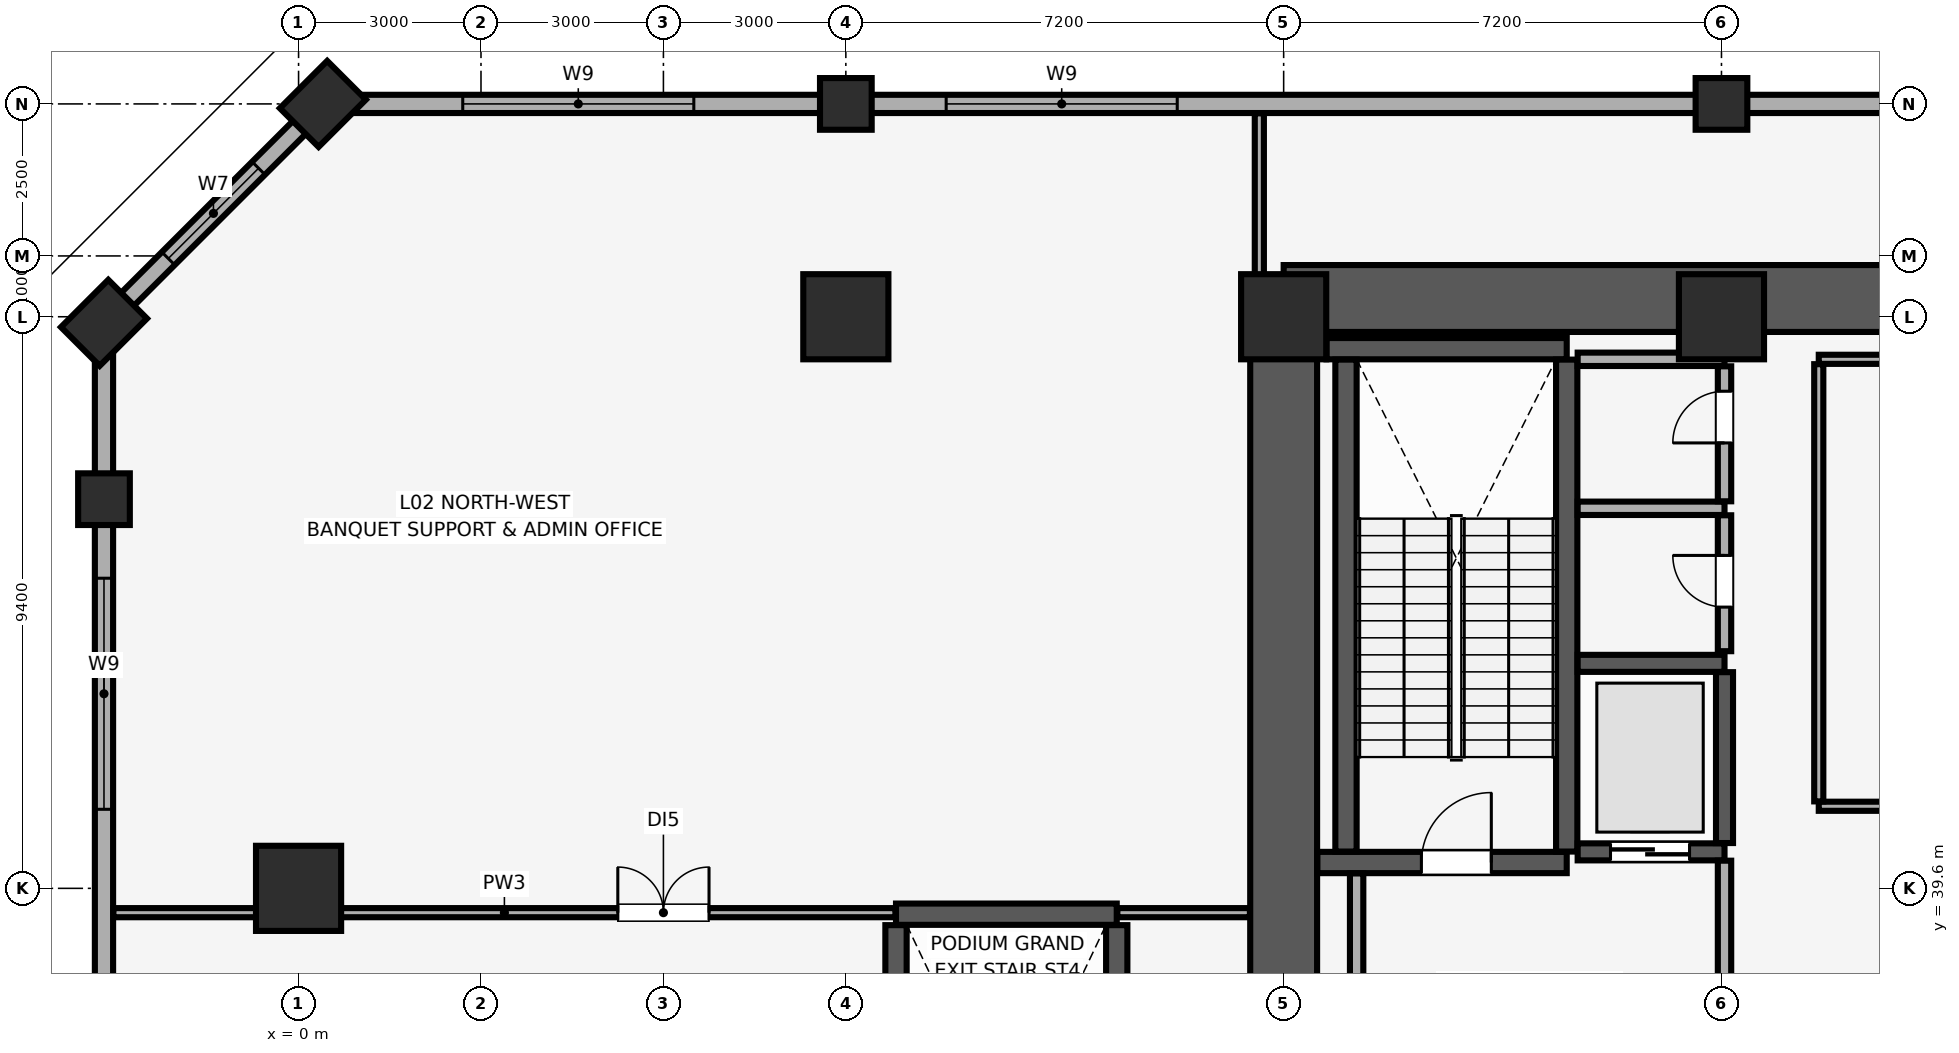
"""IFC4 building model, lengths in metres.
Left out: names, types, materials, properties, quantities, classifications, styles, units other than length and angle.
Written with IfcOpenShell. Run it as: python <this file> out.ifc"""

import sys

from ifc_helpers import new_model, si_unit, direction, frame, frame_2d, origin, origin_2d, place, context, subcontext, project, spatial, rectangle, extrude, element, fill, save


model = new_model("IFC4")
c1 = context("Model", 3, precision=1e-05, world=origin(), true_north=direction((0.0, 1.0)))
c2 = subcontext(c1, "Body", "Model", "MODEL_VIEW")
j1 = project(units=[si_unit("LENGTHUNIT", "METRE"), si_unit("PLANEANGLEUNIT", "RADIAN")], contexts=[c1])
p1 = place(None, origin())
s1 = spatial("IfcSite", under=j1, at=p1, CompositionType="ELEMENT")
p2 = place(p1, origin())
s2 = spatial("IfcBuilding", under=s1, at=p2, CompositionType="ELEMENT")
p3 = place(p2, frame((0.0, 0.0, 14.0)))
s3 = spatial("IfcBuildingStorey", under=s2, at=p3, CompositionType="ELEMENT", Elevation=14.0)
for number, where, z_axis, x_axis in (
    (1, (9.0, 52.5, 0.0), (0.0, 0.0, 1.0), (1.0, 0.0, 0.0)),
    (2, (23.4, 52.5, 0.0), (0.0, 0.0, 1.0), (1.0, 0.0, 0.0)),
    (3, (-3.2, 46.0, 0.0), (0.0, 0.0, 1.0), (1.0, 0.0, 0.0)),
):
    element("IfcColumn", number, at=place(p3, frame(where, z_axis=z_axis, x_axis=x_axis)), inside=s3, PredefinedType="COLUMN", context=c2, shape_type="SweptSolid", body=[
        extrude(rectangle(XDim=0.85, YDim=0.85, at=origin_2d()), origin(), (0.0, 0.0, 1.0), 5.08),
    ])
for number, where, z_axis, x_axis in (
    (4, (0.4, 52.5, 0.0), (0.0, 0.0, 1.0), (0.707, 0.707, 0.0)),
    (5, (-3.2, 48.9, 0.0), (0.0, 0.0, 1.0), (0.707, 0.707, 0.0)),
):
    element("IfcColumn", number, at=place(p3, frame(where, z_axis=z_axis, x_axis=x_axis)), inside=s3, PredefinedType="PILASTER", context=c2, shape_type="SweptSolid", body=[
        extrude(rectangle(XDim=1.1, YDim=0.9, at=origin_2d()), origin(), (0.0, 0.0, 1.0), 5.08),
    ])
for number, where, z_axis, x_axis in (
    (6, (9.0, 49.0, 0.0), (0.0, 0.0, 1.0), (1.0, 0.0, 0.0)),
    (7, (16.2, 49.0, 0.0), (0.0, 0.0, 1.0), (1.0, 0.0, 0.0)),
    (8, (23.4, 49.0, 0.0), (0.0, 0.0, 1.0), (1.0, 0.0, 0.0)),
    (9, (0.0, 39.6, 0.0), (0.0, 0.0, 1.0), (1.0, 0.0, 0.0)),
):
    element("IfcColumn", number, at=place(p3, frame(where, z_axis=z_axis, x_axis=x_axis)), inside=s3, PredefinedType="COLUMN", context=c2, shape_type="SweptSolid", body=[
        extrude(rectangle(XDim=1.4, YDim=1.4, at=origin_2d()), origin(), (0.0, 0.0, 1.0), 5.08),
    ])
p4 = place(p3, frame((83.6, 52.5, 0.0), z_axis=(0.0, 0.0, 1.0), x_axis=(-1.0, 0.0, 0.0)))
e10 = element("IfcWall", 10, at=p4, inside=s3, PredefinedType="SOLIDWALL", context=c2, shape_type="SweptSolid", body=[
    extrude(rectangle(XDim=83.2, YDim=0.3, at=frame_2d((41.6, 0.0))), origin(), (0.0, 0.0, 1.0), 4.13),
])
p5 = place(p4, frame((77.1, 0.0, 0.85)))
e11 = element("IfcOpeningElement", 11, at=p5, cuts=e10, PredefinedType="OPENING", context=c2, shape_type="SweptSolid", body=[
    extrude(rectangle(XDim=3.8, YDim=2.2, at=frame_2d((1.9, 1.1))), frame((0.0, 0.16, 0.0), z_axis=(0.0, -1.0, 0.0), x_axis=(1.0, 0.0, 0.0)), (0.0, 0.0, 1.0), 0.32),
])
p6 = place(p4, frame((69.15, 0.0, 0.85)))
e12 = element("IfcOpeningElement", 12, at=p6, cuts=e10, PredefinedType="OPENING", context=c2, shape_type="SweptSolid", body=[
    extrude(rectangle(XDim=3.8, YDim=2.2, at=frame_2d((1.9, 1.1))), frame((0.0, 0.16, 0.0), z_axis=(0.0, -1.0, 0.0), x_axis=(1.0, 0.0, 0.0)), (0.0, 0.0, 1.0), 0.32),
])
p7 = place(p4, frame((10.1, 0.0, 0.85)))
e13 = element("IfcOpeningElement", 13, at=p7, cuts=e10, PredefinedType="OPENING", context=c2, shape_type="SweptSolid", body=[
    extrude(rectangle(XDim=3.8, YDim=2.2, at=frame_2d((1.9, 1.1))), frame((0.0, 0.16, 0.0), z_axis=(0.0, -1.0, 0.0), x_axis=(1.0, 0.0, 0.0)), (0.0, 0.0, 1.0), 0.32),
])
p8 = place(p4, frame((2.3, 0.0, 0.85)))
e14 = element("IfcOpeningElement", 14, at=p8, cuts=e10, PredefinedType="OPENING", context=c2, shape_type="SweptSolid", body=[
    extrude(rectangle(XDim=3.8, YDim=2.2, at=frame_2d((1.9, 1.1))), frame((0.0, 0.16, 0.0), z_axis=(0.0, -1.0, 0.0), x_axis=(1.0, 0.0, 0.0)), (0.0, 0.0, 1.0), 0.32),
])
p9 = place(p3, frame((0.4, 52.5, 0.0), z_axis=(0.0, 0.0, 1.0), x_axis=(-0.707082803744, -0.707130757816, 0.0)))
e15 = element("IfcWall", 15, at=p9, inside=s3, PredefinedType="SOLIDWALL", context=c2, shape_type="SweptSolid", body=[
    extrude(rectangle(XDim=5.091, YDim=0.3, at=frame_2d((2.545, 0.0))), origin(), (0.0, 0.0, 1.0), 4.13),
])
p10 = place(p9, frame((1.496, 0.0, 0.85)))
e16 = element("IfcOpeningElement", 16, at=p10, cuts=e15, PredefinedType="OPENING", context=c2, shape_type="SweptSolid", body=[
    extrude(rectangle(XDim=2.1, YDim=1.6, at=frame_2d((1.05, 0.8))), frame((0.0, 0.16, 0.0), z_axis=(0.0, -1.0, 0.0), x_axis=(1.0, 0.0, 0.0)), (0.0, 0.0, 1.0), 0.32),
])
p11 = place(p3, frame((-3.2, 48.9, 0.0), z_axis=(0.0, 0.0, 1.0), x_axis=(0.0, -1.0, 0.0)))
e17 = element("IfcWall", 17, at=p11, inside=s3, PredefinedType="SOLIDWALL", context=c2, shape_type="SweptSolid", body=[
    extrude(rectangle(XDim=20.425, YDim=0.3, at=frame_2d((10.212, 0.0))), origin(), (0.0, 0.0, 1.0), 4.13),
])
p12 = place(p11, frame((12.5, 0.0, 0.85)))
e18 = element("IfcOpeningElement", 18, at=p12, cuts=e17, PredefinedType="OPENING", context=c2, shape_type="SweptSolid", body=[
    extrude(rectangle(XDim=3.8, YDim=2.2, at=frame_2d((1.9, 1.1))), frame((0.0, 0.16, 0.0), z_axis=(0.0, -1.0, 0.0), x_axis=(1.0, 0.0, 0.0)), (0.0, 0.0, 1.0), 0.32),
])
p13 = place(p11, frame((4.2, 0.0, 0.85)))
e19 = element("IfcOpeningElement", 19, at=p13, cuts=e17, PredefinedType="OPENING", context=c2, shape_type="SweptSolid", body=[
    extrude(rectangle(XDim=3.8, YDim=2.2, at=frame_2d((1.9, 1.1))), frame((0.0, 0.16, 0.0), z_axis=(0.0, -1.0, 0.0), x_axis=(1.0, 0.0, 0.0)), (0.0, 0.0, 1.0), 0.32),
])
p14 = place(p3, frame((16.2, 49.3, 0.0), z_axis=(0.0, 0.0, 1.0), x_axis=(1.0, 0.0, 0.0)))
e20 = element("IfcWall", 20, at=p14, inside=s3, PredefinedType="SHEAR", context=c2, shape_type="SweptSolid", body=[
    extrude(rectangle(XDim=51.6, YDim=1.1, at=frame_2d((25.8, 0.0))), origin(), (0.0, 0.0, 1.0), 5.08),
])
p15 = place(p3, frame((16.2, 29.4, 0.0), z_axis=(0.0, 0.0, 1.0), x_axis=(0.0, 1.0, 0.0)))
e21 = element("IfcWall", 21, at=p15, inside=s3, PredefinedType="SHEAR", context=c2, shape_type="SweptSolid", body=[
    extrude(rectangle(XDim=19.2, YDim=1.1, at=frame_2d((9.6, 0.0))), origin(), (0.0, 0.0, 1.0), 5.08),
])
p16 = place(p3, frame((16.755, 40.025, 0.0), z_axis=(0.0, 0.0, 1.0), x_axis=(1.0, 0.0, 0.0)))
e22 = element("IfcWall", 22, at=p16, inside=s3, PredefinedType="SHEAR", context=c2, shape_type="SweptSolid", body=[
    extrude(rectangle(XDim=4.1, YDim=0.35, at=frame_2d((2.05, 0.0))), origin(), (0.0, 0.0, 1.0), 5.08),
])
p17 = place(p16, frame((1.71, 0.0, 0.0)))
e23 = element("IfcOpeningElement", 23, at=p17, cuts=e22, PredefinedType="OPENING", context=c2, shape_type="SweptSolid", body=[
    extrude(rectangle(XDim=1.15, YDim=2.15, at=frame_2d((0.575, 1.075))), frame((0.0, 0.185, 0.0), z_axis=(0.0, -1.0, 0.0), x_axis=(1.0, 0.0, 0.0)), (0.0, 0.0, 1.0), 0.37),
])
p18 = place(p3, frame((16.905, 48.475, 0.0), z_axis=(0.0, 0.0, 1.0), x_axis=(1.0, 0.0, 0.0)))
e24 = element("IfcWall", 24, at=p18, inside=s3, PredefinedType="SHEAR", context=c2, shape_type="SweptSolid", body=[
    extrude(rectangle(XDim=3.95, YDim=0.35, at=frame_2d((1.975, 0.0))), origin(), (0.0, 0.0, 1.0), 5.08),
])
for number, where, z_axis, x_axis in (
    (25, (17.225, 40.205, 0.0), (0.0, 0.0, 1.0), (0.0, 1.0, 0.0)),
    (26, (20.855, 40.205, 0.0), (0.0, 0.0, 1.0), (0.0, 1.0, 0.0)),
):
    element("IfcWall", number, at=place(p3, frame(where, z_axis=z_axis, x_axis=x_axis)), inside=s3, PredefinedType="SHEAR", context=c2, shape_type="SweptSolid", body=[
        extrude(rectangle(XDim=8.09, YDim=0.35, at=frame_2d((4.045, 0.0))), origin(), (0.0, 0.0, 1.0), 5.08),
    ])
p19 = place(p3, frame((9.825, 39.175, 0.0), z_axis=(0.0, 0.0, 1.0), x_axis=(1.0, 0.0, 0.0)))
e27 = element("IfcWall", 27, at=p19, inside=s3, PredefinedType="SHEAR", context=c2, shape_type="SweptSolid", body=[
    extrude(rectangle(XDim=3.63, YDim=0.35, at=frame_2d((1.815, 0.0))), origin(), (0.0, 0.0, 1.0), 5.08),
])
for number, where, z_axis, x_axis in (
    (28, (9.825, 30.555, 0.0), (0.0, 0.0, 1.0), (0.0, 1.0, 0.0)),
    (29, (13.455, 30.555, 0.0), (0.0, 0.0, 1.0), (0.0, 1.0, 0.0)),
):
    element("IfcWall", number, at=place(p3, frame(where, z_axis=z_axis, x_axis=x_axis)), inside=s3, PredefinedType="SHEAR", context=c2, shape_type="SweptSolid", body=[
        extrude(rectangle(XDim=8.44, YDim=0.35, at=frame_2d((4.22, 0.0))), origin(), (0.0, 0.0, 1.0), 5.08),
    ])
p20 = place(p3, frame((21.035, 40.2, 0.0), z_axis=(0.0, 0.0, 1.0), x_axis=(1.0, 0.0, 0.0)))
e30 = element("IfcWall", 30, at=p20, inside=s3, PredefinedType="SHEAR", context=c2, shape_type="SweptSolid", body=[
    extrude(rectangle(XDim=2.415, YDim=0.28, at=frame_2d((1.208, 0.0))), origin(), (0.0, 0.0, 1.0), 5.08),
])
p21 = place(p20, frame((0.54, 0.0, 0.0)))
e31 = element("IfcOpeningElement", 31, at=p21, cuts=e30, PredefinedType="OPENING", context=c2, shape_type="SweptSolid", body=[
    extrude(rectangle(XDim=1.3, YDim=2.3, at=frame_2d((0.65, 1.15))), frame((0.0, 0.15, 0.0), z_axis=(0.0, -1.0, 0.0), x_axis=(1.0, 0.0, 0.0)), (0.0, 0.0, 1.0), 0.3),
])
p22 = place(p3, frame((21.035, 43.3, 0.0), z_axis=(0.0, 0.0, 1.0), x_axis=(1.0, 0.0, 0.0)))
e32 = element("IfcWall", 32, at=p22, inside=s3, PredefinedType="SHEAR", context=c2, shape_type="SweptSolid", body=[
    extrude(rectangle(XDim=2.415, YDim=0.28, at=frame_2d((1.208, 0.0))), origin(), (0.0, 0.0, 1.0), 5.08),
])
p23 = place(p3, frame((23.45, 40.345, 0.0), z_axis=(0.0, 0.0, 1.0), x_axis=(0.0, 1.0, 0.0)))
e33 = element("IfcWall", 33, at=p23, inside=s3, PredefinedType="SHEAR", context=c2, shape_type="SweptSolid", body=[
    extrude(rectangle(XDim=2.81, YDim=0.28, at=frame_2d((1.405, 0.0))), origin(), (0.0, 0.0, 1.0), 5.08),
])
p24 = place(p3, frame((17.4, 34.415, 0.0), z_axis=(0.0, 0.0, 1.0), x_axis=(0.0, 1.0, 0.0)))
e34 = element("IfcWall", 34, at=p24, inside=s3, PredefinedType="PARTITIONING", context=c2, shape_type="SweptSolid", body=[
    extrude(rectangle(XDim=5.43, YDim=0.22, at=frame_2d((2.715, 0.0))), origin(), (0.0, 0.0, 1.0), 5.08),
])
p25 = place(p3, frame((23.45, 34.415, 0.0), z_axis=(0.0, 0.0, 1.0), x_axis=(0.0, 1.0, 0.0)))
e35 = element("IfcWall", 35, at=p25, inside=s3, PredefinedType="PARTITIONING", context=c2, shape_type="SweptSolid", body=[
    extrude(rectangle(XDim=5.64, YDim=0.22, at=frame_2d((2.82, 0.0))), origin(), (0.0, 0.0, 1.0), 5.08),
])
p26 = place(p3, frame((21.035, 45.85, 0.0), z_axis=(0.0, 0.0, 1.0), x_axis=(1.0, 0.0, 0.0)))
e36 = element("IfcWall", 36, at=p26, inside=s3, PredefinedType="PARTITIONING", context=c2, shape_type="SweptSolid", body=[
    extrude(rectangle(XDim=2.415, YDim=0.22, at=frame_2d((1.208, 0.0))), origin(), (0.0, 0.0, 1.0), 5.08),
])
p27 = place(p3, frame((23.45, 43.5, 0.0), z_axis=(0.0, 0.0, 1.0), x_axis=(0.0, 1.0, 0.0)))
e37 = element("IfcWall", 37, at=p27, inside=s3, PredefinedType="PARTITIONING", context=c2, shape_type="SweptSolid", body=[
    extrude(rectangle(XDim=2.235, YDim=0.22, at=frame_2d((1.118, 0.0))), origin(), (0.0, 0.0, 1.0), 5.08),
])
p28 = place(p27, frame((0.725, 0.0, 0.0)))
e38 = element("IfcOpeningElement", 38, at=p28, cuts=e37, PredefinedType="OPENING", context=c2, shape_type="SweptSolid", body=[
    extrude(rectangle(XDim=0.85, YDim=2.1, at=frame_2d((0.425, 1.05))), frame((0.0, 0.12, 0.0), z_axis=(0.0, -1.0, 0.0), x_axis=(1.0, 0.0, 0.0)), (0.0, 0.0, 1.0), 0.24),
])
p29 = place(p3, frame((21.035, 48.3, 0.0), z_axis=(0.0, 0.0, 1.0), x_axis=(1.0, 0.0, 0.0)))
e39 = element("IfcWall", 39, at=p29, inside=s3, PredefinedType="PARTITIONING", context=c2, shape_type="SweptSolid", body=[
    extrude(rectangle(XDim=2.415, YDim=0.22, at=frame_2d((1.208, 0.0))), origin(), (0.0, 0.0, 1.0), 5.08),
])
p30 = place(p3, frame((23.45, 45.965, 0.0), z_axis=(0.0, 0.0, 1.0), x_axis=(0.0, 1.0, 0.0)))
e40 = element("IfcWall", 40, at=p30, inside=s3, PredefinedType="PARTITIONING", context=c2, shape_type="SweptSolid", body=[
    extrude(rectangle(XDim=2.22, YDim=0.22, at=frame_2d((1.11, 0.0))), origin(), (0.0, 0.0, 1.0), 5.08),
])
p31 = place(p30, frame((0.96, 0.0, 0.0)))
e41 = element("IfcOpeningElement", 41, at=p31, cuts=e40, PredefinedType="OPENING", context=c2, shape_type="SweptSolid", body=[
    extrude(rectangle(XDim=0.85, YDim=2.1, at=frame_2d((0.425, 1.05))), frame((0.0, 0.12, 0.0), z_axis=(0.0, -1.0, 0.0), x_axis=(1.0, 0.0, 0.0)), (0.0, 0.0, 1.0), 0.24),
])
p32 = place(p3, frame((25.0, 40.95, 0.0), z_axis=(0.0, 0.0, 1.0), x_axis=(1.0, 0.0, 0.0)))
e42 = element("IfcWall", 42, at=p32, inside=s3, PredefinedType="PARTITIONING", context=c2, shape_type="SweptSolid", body=[
    extrude(rectangle(XDim=7.8, YDim=0.15, at=frame_2d((3.9, 0.0))), origin(), (0.0, 0.0, 1.0), 5.08),
])
p33 = place(p32, frame((3.475, 0.0, 0.0)))
e43 = element("IfcOpeningElement", 43, at=p33, cuts=e42, PredefinedType="OPENING", context=c2, shape_type="SweptSolid", body=[
    extrude(rectangle(XDim=0.85, YDim=2.1, at=frame_2d((0.425, 1.05))), frame((0.0, 0.085, 0.0), z_axis=(0.0, -1.0, 0.0), x_axis=(1.0, 0.0, 0.0)), (0.0, 0.0, 1.0), 0.17),
])
p34 = place(p3, frame((25.0, 48.3, 0.0), z_axis=(0.0, 0.0, 1.0), x_axis=(1.0, 0.0, 0.0)))
e44 = element("IfcWall", 44, at=p34, inside=s3, PredefinedType="PARTITIONING", context=c2, shape_type="SweptSolid", body=[
    extrude(rectangle(XDim=7.8, YDim=0.15, at=frame_2d((3.9, 0.0))), origin(), (0.0, 0.0, 1.0), 5.08),
])
p35 = place(p3, frame((25.0, 41.03, 0.0), z_axis=(0.0, 0.0, 1.0), x_axis=(0.0, 1.0, 0.0)))
e45 = element("IfcWall", 45, at=p35, inside=s3, PredefinedType="PARTITIONING", context=c2, shape_type="SweptSolid", body=[
    extrude(rectangle(XDim=7.19, YDim=0.15, at=frame_2d((3.595, 0.0))), origin(), (0.0, 0.0, 1.0), 5.08),
])
p36 = place(p3, frame((-3.045, 39.2, 0.0), z_axis=(0.0, 0.0, 1.0), x_axis=(1.0, 0.0, 0.0)))
e46 = element("IfcWall", 46, at=p36, inside=s3, PredefinedType="PARTITIONING", context=c2, shape_type="SweptSolid", body=[
    extrude(rectangle(XDim=12.86, YDim=0.15, at=frame_2d((6.43, 0.0))), origin(), (0.0, 0.0, 1.0), 5.08),
])
p37 = place(p36, frame((8.295, 0.0, 0.0)))
e47 = element("IfcOpeningElement", 47, at=p37, cuts=e46, PredefinedType="OPENING", context=c2, shape_type="SweptSolid", body=[
    extrude(rectangle(XDim=1.5, YDim=2.25, at=frame_2d((0.75, 1.125))), frame((0.0, 0.085, 0.0), z_axis=(0.0, -1.0, 0.0), x_axis=(1.0, 0.0, 0.0)), (0.0, 0.0, 1.0), 0.17),
])
p38 = place(p3, frame((13.465, 39.2, 0.0), z_axis=(0.0, 0.0, 1.0), x_axis=(1.0, 0.0, 0.0)))
e48 = element("IfcWall", 48, at=p38, inside=s3, PredefinedType="PARTITIONING", context=c2, shape_type="SweptSolid", body=[
    extrude(rectangle(XDim=2.18, YDim=0.15, at=frame_2d((1.09, 0.0))), origin(), (0.0, 0.0, 1.0), 5.08),
])
p39 = place(p3, frame((15.8, 48.61, 0.0), z_axis=(0.0, 0.0, 1.0), x_axis=(0.0, 1.0, 0.0)))
e49 = element("IfcWall", 49, at=p39, inside=s3, PredefinedType="PARTITIONING", context=c2, shape_type="SweptSolid", body=[
    extrude(rectangle(XDim=3.735, YDim=0.15, at=frame_2d((1.867, 0.0))), origin(), (0.0, 0.0, 1.0), 5.08),
])
p40 = place(p10, origin())
e50 = element("IfcWindow", 50, at=p40, inside=s3, PartitioningType="SINGLE_PANEL", PredefinedType="WINDOW", context=c2, shape_type="SweptSolid", body=[
    extrude(rectangle(XDim=2.1, YDim=1.6, at=frame_2d((1.05, 0.8))), frame((0.0, 0.03, 0.0), z_axis=(0.0, -1.0, 0.0), x_axis=(1.0, 0.0, 0.0)), (0.0, 0.0, 1.0), 0.06),
])
fill(e16, e50)
p41 = place(p13, origin())
e51 = element("IfcWindow", 51, at=p41, inside=s3, PartitioningType="SINGLE_PANEL", PredefinedType="WINDOW", context=c2, shape_type="SweptSolid", body=[
    extrude(rectangle(XDim=3.8, YDim=2.2, at=frame_2d((1.9, 1.1))), frame((0.0, 0.03, 0.0), z_axis=(0.0, -1.0, 0.0), x_axis=(1.0, 0.0, 0.0)), (0.0, 0.0, 1.0), 0.06),
])
fill(e19, e51)
p42 = place(p5, origin())
e52 = element("IfcWindow", 52, at=p42, inside=s3, PartitioningType="SINGLE_PANEL", PredefinedType="WINDOW", context=c2, shape_type="SweptSolid", body=[
    extrude(rectangle(XDim=3.8, YDim=2.2, at=frame_2d((1.9, 1.1))), frame((0.0, 0.03, 0.0), z_axis=(0.0, -1.0, 0.0), x_axis=(1.0, 0.0, 0.0)), (0.0, 0.0, 1.0), 0.06),
])
fill(e11, e52)
p43 = place(p6, origin())
e53 = element("IfcWindow", 53, at=p43, inside=s3, PartitioningType="SINGLE_PANEL", PredefinedType="WINDOW", context=c2, shape_type="SweptSolid", body=[
    extrude(rectangle(XDim=3.8, YDim=2.2, at=frame_2d((1.9, 1.1))), frame((0.0, 0.03, 0.0), z_axis=(0.0, -1.0, 0.0), x_axis=(1.0, 0.0, 0.0)), (0.0, 0.0, 1.0), 0.06),
])
fill(e12, e53)
p44 = place(p17, origin())
e54 = element("IfcDoor", 54, at=p44, inside=s3, OperationType="SINGLE_SWING_RIGHT", PredefinedType="DOOR", context=c2, shape_type="SweptSolid", body=[
    extrude(rectangle(XDim=1.15, YDim=2.15, at=frame_2d((0.575, 1.075))), frame((0.0, 0.025, 0.0), z_axis=(0.0, -1.0, 0.0), x_axis=(1.0, 0.0, 0.0)), (0.0, 0.0, 1.0), 0.05),
])
fill(e23, e54)
p45 = place(p21, origin())
e55 = element("IfcDoor", 55, at=p45, inside=s3, OperationType="DOUBLE_DOOR_SLIDING", PredefinedType="DOOR", context=c2, shape_type="SweptSolid", body=[
    extrude(rectangle(XDim=1.3, YDim=2.3, at=frame_2d((0.65, 1.15))), frame((0.0, 0.025, 0.0), z_axis=(0.0, -1.0, 0.0), x_axis=(1.0, 0.0, 0.0)), (0.0, 0.0, 1.0), 0.05),
])
fill(e31, e55)
p46 = place(p28, origin())
e56 = element("IfcDoor", 56, at=p46, inside=s3, OperationType="SINGLE_SWING_RIGHT", PredefinedType="DOOR", context=c2, shape_type="SweptSolid", body=[
    extrude(rectangle(XDim=0.85, YDim=2.1, at=frame_2d((0.425, 1.05))), frame((0.0, 0.025, 0.0), z_axis=(0.0, -1.0, 0.0), x_axis=(1.0, 0.0, 0.0)), (0.0, 0.0, 1.0), 0.05),
])
fill(e38, e56)
p47 = place(p31, origin())
e57 = element("IfcDoor", 57, at=p47, inside=s3, OperationType="SINGLE_SWING_LEFT", PredefinedType="DOOR", context=c2, shape_type="SweptSolid", body=[
    extrude(rectangle(XDim=0.85, YDim=2.1, at=frame_2d((0.425, 1.05))), frame((0.0, 0.025, 0.0), z_axis=(0.0, -1.0, 0.0), x_axis=(1.0, 0.0, 0.0)), (0.0, 0.0, 1.0), 0.05),
])
fill(e41, e57)
p48 = place(p37, origin())
e58 = element("IfcDoor", 58, at=p48, inside=s3, OperationType="DOUBLE_DOOR_SINGLE_SWING", PredefinedType="DOOR", context=c2, shape_type="SweptSolid", body=[
    extrude(rectangle(XDim=1.5, YDim=2.25, at=frame_2d((0.75, 1.125))), frame((0.0, 0.025, 0.0), z_axis=(0.0, -1.0, 0.0), x_axis=(1.0, 0.0, 0.0)), (0.0, 0.0, 1.0), 0.05),
])
fill(e47, e58)
save(model, sys.argv[1])
